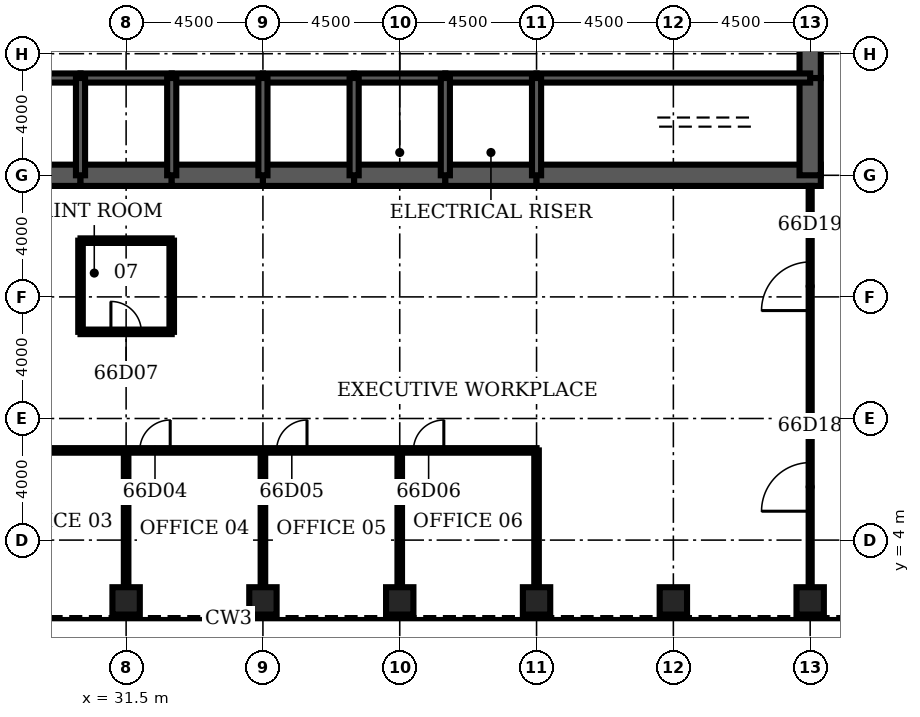
"""IFC4 building model, lengths in metres.
Left out: names, types, materials, properties, quantities, classifications, styles, units other than length and angle.
Written with IfcOpenShell. Run it as: python <this file> out.ifc"""

import sys

from ifc_helpers import new_model, si_unit, direction, frame, frame_2d, origin, origin_2d, place, context, subcontext, project, spatial, rectangle, hollow_rectangle, extrude, element, fill, save


model = new_model("IFC4")
c1 = context("Model", 3, precision=1e-05, world=origin(), true_north=direction((0.0, 1.0)))
c2 = subcontext(c1, "Body", "Model", "MODEL_VIEW")
j1 = project(units=[si_unit("LENGTHUNIT", "METRE"), si_unit("PLANEANGLEUNIT", "RADIAN")], contexts=[c1])
p1 = place(None, origin())
s1 = spatial("IfcSite", under=j1, at=p1, CompositionType="ELEMENT")
p2 = place(p1, origin())
s2 = spatial("IfcBuilding", under=s1, at=p2, CompositionType="ELEMENT")
p3 = place(p2, frame((0.0, 0.0, 292.1)))
s3 = spatial("IfcBuildingStorey", under=s2, at=p3, CompositionType="ELEMENT", Elevation=292.1)
for number, where, z_axis, x_axis in (
    (1, (31.5, 2.0, 0.0), (0.0, 0.0, 1.0), (0.0, 1.0, 0.0)),
    (2, (36.0, 2.0, 0.0), (0.0, 0.0, 1.0), (0.0, 1.0, 0.0)),
    (3, (40.5, 2.0, 0.0), (0.0, 0.0, 1.0), (0.0, 1.0, 0.0)),
    (4, (45.0, 2.0, 0.0), (0.0, 0.0, 1.0), (0.0, 1.0, 0.0)),
    (5, (49.5, 2.0, 0.0), (0.0, 0.0, 1.0), (0.0, 1.0, 0.0)),
    (6, (54.0, 2.0, 0.0), (0.0, 0.0, 1.0), (0.0, 1.0, 0.0)),
):
    element("IfcColumn", number, at=place(p3, frame(where, z_axis=z_axis, x_axis=x_axis)), inside=s3, PredefinedType="COLUMN", context=c2, shape_type="SweptSolid", body=[
        extrude(hollow_rectangle(XDim=0.9, YDim=0.9, WallThickness=0.06, at=origin_2d()), origin(), (0.0, 0.0, 1.0), 4.2),
    ])
for number, where, z_axis, x_axis in (
    (7, (27.0, 16.0, 0.0), (0.0, 0.0, 1.0), (1.0, 0.0, 0.0)),
    (8, (30.0, 16.0, 0.0), (0.0, 0.0, 1.0), (1.0, 0.0, 0.0)),
    (9, (33.0, 16.0, 0.0), (0.0, 0.0, 1.0), (1.0, 0.0, 0.0)),
    (10, (36.0, 16.0, 0.0), (0.0, 0.0, 1.0), (1.0, 0.0, 0.0)),
    (11, (39.0, 16.0, 0.0), (0.0, 0.0, 1.0), (1.0, 0.0, 0.0)),
    (12, (42.0, 16.0, 0.0), (0.0, 0.0, 1.0), (1.0, 0.0, 0.0)),
):
    element("IfcWall", number, at=place(p3, frame(where, z_axis=z_axis, x_axis=x_axis)), inside=s3, PredefinedType="SHEAR", context=c2, shape_type="SweptSolid", body=[
        extrude(rectangle(XDim=3.0, YDim=0.7, at=frame_2d((1.5, 0.0))), origin(), (0.0, 0.0, 1.0), 4.2),
    ])
p4 = place(p3, frame((45.0, 16.0, 0.0), z_axis=(0.0, 0.0, 1.0), x_axis=(1.0, 0.0, 0.0)))
e13 = element("IfcWall", 13, at=p4, inside=s3, PredefinedType="SHEAR", context=c2, shape_type="SweptSolid", body=[
    extrude(rectangle(XDim=9.35, YDim=0.7, at=frame_2d((4.675, 0.0))), origin(), (0.0, 0.0, 1.0), 4.2),
])
p5 = place(p3, frame((54.0, 16.0, 0.0), z_axis=(0.0, 0.0, 1.0), x_axis=(0.0, 1.0, 0.0)))
e14 = element("IfcWall", 14, at=p5, inside=s3, PredefinedType="SHEAR", context=c2, shape_type="SweptSolid", body=[
    extrude(rectangle(XDim=3.2, YDim=0.7, at=frame_2d((1.6, 0.0))), origin(), (0.0, 0.0, 1.0), 4.2),
])
p6 = place(p3, frame((54.0, 19.2, 0.0), z_axis=(0.0, 0.0, 1.0), x_axis=(0.0, 1.0, 0.0)))
e15 = element("IfcWall", 15, at=p6, inside=s3, PredefinedType="SHEAR", context=c2, shape_type="SweptSolid", body=[
    extrude(rectangle(XDim=2.8, YDim=0.7, at=frame_2d((1.4, 0.0))), origin(), (0.0, 0.0, 1.0), 4.2),
])
p7 = place(p6, frame((0.4, 0.0, 0.0)))
e16 = element("IfcOpeningElement", 16, at=p7, cuts=e15, PredefinedType="OPENING", context=c2, shape_type="SweptSolid", body=[
    extrude(rectangle(XDim=1.8, YDim=2.1, at=frame_2d((0.9, 1.05))), frame((0.0, 0.36, 0.0), z_axis=(0.0, -1.0, 0.0), x_axis=(1.0, 0.0, 0.0)), (0.0, 0.0, 1.0), 0.72),
])
p8 = place(p3, frame((27.0, 19.2, 0.0), z_axis=(0.0, 0.0, 1.0), x_axis=(1.0, 0.0, 0.0)))
e17 = element("IfcWall", 17, at=p8, inside=s3, PredefinedType="SOLIDWALL", context=c2, shape_type="SweptSolid", body=[
    extrude(rectangle(XDim=3.0, YDim=0.3, at=frame_2d((1.5, 0.0))), origin(), (0.0, 0.0, 1.0), 4.2),
])
p9 = place(p8, frame((0.95, 0.0, 0.0)))
e18 = element("IfcOpeningElement", 18, at=p9, cuts=e17, PredefinedType="OPENING", context=c2, shape_type="SweptSolid", body=[
    extrude(rectangle(XDim=1.1, YDim=2.2, at=frame_2d((0.55, 1.1))), frame((0.0, 0.16, 0.0), z_axis=(0.0, -1.0, 0.0), x_axis=(1.0, 0.0, 0.0)), (0.0, 0.0, 1.0), 0.32),
])
p10 = place(p3, frame((30.0, 19.2, 0.0), z_axis=(0.0, 0.0, 1.0), x_axis=(1.0, 0.0, 0.0)))
e19 = element("IfcWall", 19, at=p10, inside=s3, PredefinedType="SOLIDWALL", context=c2, shape_type="SweptSolid", body=[
    extrude(rectangle(XDim=3.0, YDim=0.3, at=frame_2d((1.5, 0.0))), origin(), (0.0, 0.0, 1.0), 4.2),
])
p11 = place(p10, frame((0.95, 0.0, 0.0)))
e20 = element("IfcOpeningElement", 20, at=p11, cuts=e19, PredefinedType="OPENING", context=c2, shape_type="SweptSolid", body=[
    extrude(rectangle(XDim=1.1, YDim=2.2, at=frame_2d((0.55, 1.1))), frame((0.0, 0.16, 0.0), z_axis=(0.0, -1.0, 0.0), x_axis=(1.0, 0.0, 0.0)), (0.0, 0.0, 1.0), 0.32),
])
p12 = place(p3, frame((33.0, 19.2, 0.0), z_axis=(0.0, 0.0, 1.0), x_axis=(1.0, 0.0, 0.0)))
e21 = element("IfcWall", 21, at=p12, inside=s3, PredefinedType="SOLIDWALL", context=c2, shape_type="SweptSolid", body=[
    extrude(rectangle(XDim=3.0, YDim=0.3, at=frame_2d((1.5, 0.0))), origin(), (0.0, 0.0, 1.0), 4.2),
])
p13 = place(p12, frame((0.95, 0.0, 0.0)))
e22 = element("IfcOpeningElement", 22, at=p13, cuts=e21, PredefinedType="OPENING", context=c2, shape_type="SweptSolid", body=[
    extrude(rectangle(XDim=1.1, YDim=2.2, at=frame_2d((0.55, 1.1))), frame((0.0, 0.16, 0.0), z_axis=(0.0, -1.0, 0.0), x_axis=(1.0, 0.0, 0.0)), (0.0, 0.0, 1.0), 0.32),
])
p14 = place(p3, frame((36.0, 19.2, 0.0), z_axis=(0.0, 0.0, 1.0), x_axis=(1.0, 0.0, 0.0)))
e23 = element("IfcWall", 23, at=p14, inside=s3, PredefinedType="SOLIDWALL", context=c2, shape_type="SweptSolid", body=[
    extrude(rectangle(XDim=3.0, YDim=0.3, at=frame_2d((1.5, 0.0))), origin(), (0.0, 0.0, 1.0), 4.2),
])
p15 = place(p14, frame((0.95, 0.0, 0.0)))
e24 = element("IfcOpeningElement", 24, at=p15, cuts=e23, PredefinedType="OPENING", context=c2, shape_type="SweptSolid", body=[
    extrude(rectangle(XDim=1.1, YDim=2.2, at=frame_2d((0.55, 1.1))), frame((0.0, 0.16, 0.0), z_axis=(0.0, -1.0, 0.0), x_axis=(1.0, 0.0, 0.0)), (0.0, 0.0, 1.0), 0.32),
])
p16 = place(p3, frame((39.0, 19.2, 0.0), z_axis=(0.0, 0.0, 1.0), x_axis=(1.0, 0.0, 0.0)))
e25 = element("IfcWall", 25, at=p16, inside=s3, PredefinedType="SOLIDWALL", context=c2, shape_type="SweptSolid", body=[
    extrude(rectangle(XDim=3.0, YDim=0.3, at=frame_2d((1.5, 0.0))), origin(), (0.0, 0.0, 1.0), 4.2),
])
p17 = place(p16, frame((1.0, 0.0, 0.0)))
e26 = element("IfcOpeningElement", 26, at=p17, cuts=e25, PredefinedType="OPENING", context=c2, shape_type="SweptSolid", body=[
    extrude(rectangle(XDim=1.0, YDim=2.1, at=frame_2d((0.5, 1.05))), frame((0.0, 0.16, 0.0), z_axis=(0.0, -1.0, 0.0), x_axis=(1.0, 0.0, 0.0)), (0.0, 0.0, 1.0), 0.32),
])
p18 = place(p3, frame((42.0, 19.2, 0.0), z_axis=(0.0, 0.0, 1.0), x_axis=(1.0, 0.0, 0.0)))
e27 = element("IfcWall", 27, at=p18, inside=s3, PredefinedType="SOLIDWALL", context=c2, shape_type="SweptSolid", body=[
    extrude(rectangle(XDim=3.0, YDim=0.3, at=frame_2d((1.5, 0.0))), origin(), (0.0, 0.0, 1.0), 4.2),
])
p19 = place(p18, frame((1.0, 0.0, 0.0)))
e28 = element("IfcOpeningElement", 28, at=p19, cuts=e27, PredefinedType="OPENING", context=c2, shape_type="SweptSolid", body=[
    extrude(rectangle(XDim=1.0, YDim=2.1, at=frame_2d((0.5, 1.05))), frame((0.0, 0.16, 0.0), z_axis=(0.0, -1.0, 0.0), x_axis=(1.0, 0.0, 0.0)), (0.0, 0.0, 1.0), 0.32),
])
p20 = place(p3, frame((45.0, 19.2, 0.0), z_axis=(0.0, 0.0, 1.0), x_axis=(1.0, 0.0, 0.0)))
e29 = element("IfcWall", 29, at=p20, inside=s3, PredefinedType="SOLIDWALL", context=c2, shape_type="SweptSolid", body=[
    extrude(rectangle(XDim=9.0, YDim=0.3, at=frame_2d((4.5, 0.0))), origin(), (0.0, 0.0, 1.0), 4.2),
])
p21 = place(p20, frame((7.35, 0.0, 0.0)))
e30 = element("IfcOpeningElement", 30, at=p21, cuts=e29, PredefinedType="OPENING", context=c2, shape_type="SweptSolid", body=[
    extrude(rectangle(XDim=1.0, YDim=2.1, at=frame_2d((0.5, 1.05))), frame((0.0, 0.16, 0.0), z_axis=(0.0, -1.0, 0.0), x_axis=(1.0, 0.0, 0.0)), (0.0, 0.0, 1.0), 0.32),
])
for number, where, z_axis, x_axis in (
    (31, (30.0, 16.0, 0.0), (0.0, 0.0, 1.0), (0.0, 1.0, 0.0)),
    (32, (33.0, 16.0, 0.0), (0.0, 0.0, 1.0), (0.0, 1.0, 0.0)),
    (33, (36.0, 16.0, 0.0), (0.0, 0.0, 1.0), (0.0, 1.0, 0.0)),
    (34, (39.0, 16.0, 0.0), (0.0, 0.0, 1.0), (0.0, 1.0, 0.0)),
    (35, (42.0, 16.0, 0.0), (0.0, 0.0, 1.0), (0.0, 1.0, 0.0)),
    (36, (45.0, 16.0, 0.0), (0.0, 0.0, 1.0), (0.0, 1.0, 0.0)),
):
    element("IfcWall", number, at=place(p3, frame(where, z_axis=z_axis, x_axis=x_axis)), inside=s3, PredefinedType="SOLIDWALL", context=c2, shape_type="SweptSolid", body=[
        extrude(rectangle(XDim=3.2, YDim=0.3, at=frame_2d((1.6, 0.0))), origin(), (0.0, 0.0, 1.0), 4.2),
    ])
p22 = place(p3, frame((39.15, 17.3, 0.0), z_axis=(0.0, 0.0, 1.0), x_axis=(1.0, 0.0, 0.0)))
e37 = element("IfcWall", 37, at=p22, inside=s3, PredefinedType="SOLIDWALL", context=c2, shape_type="SweptSolid", body=[
    extrude(rectangle(XDim=2.7, YDim=0.3, at=frame_2d((1.35, 0.0))), origin(), (0.0, 0.0, 1.0), 4.04),
])
p23 = place(p22, frame((0.85, 0.0, 0.0)))
e38 = element("IfcOpeningElement", 38, at=p23, cuts=e37, PredefinedType="OPENING", context=c2, shape_type="SweptSolid", body=[
    extrude(rectangle(XDim=1.0, YDim=2.1, at=frame_2d((0.5, 1.05))), frame((0.0, 0.16, 0.0), z_axis=(0.0, -1.0, 0.0), x_axis=(1.0, 0.0, 0.0)), (0.0, 0.0, 1.0), 0.32),
])
p24 = place(p3, frame((42.15, 17.3, 0.0), z_axis=(0.0, 0.0, 1.0), x_axis=(1.0, 0.0, 0.0)))
e39 = element("IfcWall", 39, at=p24, inside=s3, PredefinedType="SOLIDWALL", context=c2, shape_type="SweptSolid", body=[
    extrude(rectangle(XDim=2.7, YDim=0.3, at=frame_2d((1.35, 0.0))), origin(), (0.0, 0.0, 1.0), 4.04),
])
p25 = place(p24, frame((0.85, 0.0, 0.0)))
e40 = element("IfcOpeningElement", 40, at=p25, cuts=e39, PredefinedType="OPENING", context=c2, shape_type="SweptSolid", body=[
    extrude(rectangle(XDim=1.0, YDim=2.1, at=frame_2d((0.5, 1.05))), frame((0.0, 0.16, 0.0), z_axis=(0.0, -1.0, 0.0), x_axis=(1.0, 0.0, 0.0)), (0.0, 0.0, 1.0), 0.32),
])
p26 = place(p3, frame((18.0, 6.95, 0.0), z_axis=(0.0, 0.0, 1.0), x_axis=(1.0, 0.0, 0.0)))
e41 = element("IfcWall", 41, at=p26, inside=s3, PredefinedType="PARTITIONING", context=c2, shape_type="SweptSolid", body=[
    extrude(rectangle(XDim=27.0, YDim=0.15, at=frame_2d((13.5, 0.0))), origin(), (0.0, 0.0, 1.0), 3.0),
])
p27 = place(p26, frame((0.45, 0.0, 0.0)))
e42 = element("IfcOpeningElement", 42, at=p27, cuts=e41, PredefinedType="OPENING", context=c2, shape_type="SweptSolid", body=[
    extrude(rectangle(XDim=1.0, YDim=2.1, at=frame_2d((0.5, 1.05))), frame((0.0, 0.085, 0.0), z_axis=(0.0, -1.0, 0.0), x_axis=(1.0, 0.0, 0.0)), (0.0, 0.0, 1.0), 0.17),
])
p28 = place(p26, frame((4.95, 0.0, 0.0)))
e43 = element("IfcOpeningElement", 43, at=p28, cuts=e41, PredefinedType="OPENING", context=c2, shape_type="SweptSolid", body=[
    extrude(rectangle(XDim=1.0, YDim=2.1, at=frame_2d((0.5, 1.05))), frame((0.0, 0.085, 0.0), z_axis=(0.0, -1.0, 0.0), x_axis=(1.0, 0.0, 0.0)), (0.0, 0.0, 1.0), 0.17),
])
p29 = place(p26, frame((9.45, 0.0, 0.0)))
e44 = element("IfcOpeningElement", 44, at=p29, cuts=e41, PredefinedType="OPENING", context=c2, shape_type="SweptSolid", body=[
    extrude(rectangle(XDim=1.0, YDim=2.1, at=frame_2d((0.5, 1.05))), frame((0.0, 0.085, 0.0), z_axis=(0.0, -1.0, 0.0), x_axis=(1.0, 0.0, 0.0)), (0.0, 0.0, 1.0), 0.17),
])
p30 = place(p26, frame((13.95, 0.0, 0.0)))
e45 = element("IfcOpeningElement", 45, at=p30, cuts=e41, PredefinedType="OPENING", context=c2, shape_type="SweptSolid", body=[
    extrude(rectangle(XDim=1.0, YDim=2.1, at=frame_2d((0.5, 1.05))), frame((0.0, 0.085, 0.0), z_axis=(0.0, -1.0, 0.0), x_axis=(1.0, 0.0, 0.0)), (0.0, 0.0, 1.0), 0.17),
])
p31 = place(p26, frame((18.45, 0.0, 0.0)))
e46 = element("IfcOpeningElement", 46, at=p31, cuts=e41, PredefinedType="OPENING", context=c2, shape_type="SweptSolid", body=[
    extrude(rectangle(XDim=1.0, YDim=2.1, at=frame_2d((0.5, 1.05))), frame((0.0, 0.085, 0.0), z_axis=(0.0, -1.0, 0.0), x_axis=(1.0, 0.0, 0.0)), (0.0, 0.0, 1.0), 0.17),
])
p32 = place(p26, frame((22.95, 0.0, 0.0)))
e47 = element("IfcOpeningElement", 47, at=p32, cuts=e41, PredefinedType="OPENING", context=c2, shape_type="SweptSolid", body=[
    extrude(rectangle(XDim=1.0, YDim=2.1, at=frame_2d((0.5, 1.05))), frame((0.0, 0.085, 0.0), z_axis=(0.0, -1.0, 0.0), x_axis=(1.0, 0.0, 0.0)), (0.0, 0.0, 1.0), 0.17),
])
p33 = place(p3, frame((30.0, 10.85, 0.0), z_axis=(0.0, 0.0, 1.0), x_axis=(1.0, 0.0, 0.0)))
e48 = element("IfcWall", 48, at=p33, inside=s3, PredefinedType="PARTITIONING", context=c2, shape_type="SweptSolid", body=[
    extrude(rectangle(XDim=3.0, YDim=0.15, at=frame_2d((1.5, 0.0))), origin(), (0.0, 0.0, 1.0), 3.0),
])
p34 = place(p33, frame((1.0, 0.0, 0.0)))
e49 = element("IfcOpeningElement", 49, at=p34, cuts=e48, PredefinedType="OPENING", context=c2, shape_type="SweptSolid", body=[
    extrude(rectangle(XDim=1.0, YDim=2.1, at=frame_2d((0.5, 1.05))), frame((0.0, 0.085, 0.0), z_axis=(0.0, -1.0, 0.0), x_axis=(1.0, 0.0, 0.0)), (0.0, 0.0, 1.0), 0.17),
])
for number, where, z_axis, x_axis in (
    (50, (30.0, 13.85, 0.0), (0.0, 0.0, 1.0), (1.0, 0.0, 0.0)),
    (51, (30.0, 10.85, 0.0), (0.0, 0.0, 1.0), (0.0, 1.0, 0.0)),
):
    element("IfcWall", number, at=place(p3, frame(where, z_axis=z_axis, x_axis=x_axis)), inside=s3, PredefinedType="PARTITIONING", context=c2, shape_type="SweptSolid", body=[
        extrude(rectangle(XDim=3.0, YDim=0.15, at=frame_2d((1.5, 0.0))), origin(), (0.0, 0.0, 1.0), 3.0),
    ])
p35 = place(p3, frame((31.5, 2.45, 0.0), z_axis=(0.0, 0.0, 1.0), x_axis=(0.0, 1.0, 0.0)))
e52 = element("IfcWall", 52, at=p35, inside=s3, PredefinedType="PARTITIONING", context=c2, shape_type="SweptSolid", body=[
    extrude(rectangle(XDim=4.5, YDim=0.15, at=frame_2d((2.25, 0.0))), origin(), (0.0, 0.0, 1.0), 3.0),
])
p36 = place(p3, frame((33.0, 10.85, 0.0), z_axis=(0.0, 0.0, 1.0), x_axis=(0.0, 1.0, 0.0)))
e53 = element("IfcWall", 53, at=p36, inside=s3, PredefinedType="PARTITIONING", context=c2, shape_type="SweptSolid", body=[
    extrude(rectangle(XDim=3.0, YDim=0.15, at=frame_2d((1.5, 0.0))), origin(), (0.0, 0.0, 1.0), 3.0),
])
for number, where, z_axis, x_axis in (
    (54, (36.0, 2.45, 0.0), (0.0, 0.0, 1.0), (0.0, 1.0, 0.0)),
    (55, (40.5, 2.45, 0.0), (0.0, 0.0, 1.0), (0.0, 1.0, 0.0)),
    (56, (45.0, 2.45, 0.0), (0.0, 0.0, 1.0), (0.0, 1.0, 0.0)),
):
    element("IfcWall", number, at=place(p3, frame(where, z_axis=z_axis, x_axis=x_axis)), inside=s3, PredefinedType="PARTITIONING", context=c2, shape_type="SweptSolid", body=[
        extrude(rectangle(XDim=4.5, YDim=0.15, at=frame_2d((2.25, 0.0))), origin(), (0.0, 0.0, 1.0), 3.0),
    ])
p37 = place(p3, frame((54.0, 2.45, 0.0), z_axis=(0.0, 0.0, 1.0), x_axis=(0.0, 1.0, 0.0)))
e57 = element("IfcWall", 57, at=p37, inside=s3, PredefinedType="PARTITIONING", context=c2, shape_type="SweptSolid", body=[
    extrude(rectangle(XDim=13.2, YDim=0.1, at=frame_2d((6.6, 0.0))), origin(), (0.0, 0.0, 1.0), 3.0),
])
p38 = place(p37, frame((2.5, 0.0, 0.0)))
e58 = element("IfcOpeningElement", 58, at=p38, cuts=e57, PredefinedType="OPENING", context=c2, shape_type="SweptSolid", body=[
    extrude(rectangle(XDim=1.6, YDim=2.1, at=frame_2d((0.8, 1.05))), frame((0.0, 0.06, 0.0), z_axis=(0.0, -1.0, 0.0), x_axis=(1.0, 0.0, 0.0)), (0.0, 0.0, 1.0), 0.12),
])
p39 = place(p37, frame((9.1, 0.0, 0.0)))
e59 = element("IfcOpeningElement", 59, at=p39, cuts=e57, PredefinedType="OPENING", context=c2, shape_type="SweptSolid", body=[
    extrude(rectangle(XDim=1.6, YDim=2.1, at=frame_2d((0.8, 1.05))), frame((0.0, 0.06, 0.0), z_axis=(0.0, -1.0, 0.0), x_axis=(1.0, 0.0, 0.0)), (0.0, 0.0, 1.0), 0.12),
])
p40 = place(p23, origin())
e60 = element("IfcDoor", 60, at=p40, inside=s3, OperationType="SINGLE_SWING_LEFT", PredefinedType="DOOR", context=c2, shape_type="SweptSolid", body=[
    extrude(rectangle(XDim=1.0, YDim=2.1, at=frame_2d((0.5, 1.05))), frame((0.0, 0.025, 0.0), z_axis=(0.0, -1.0, 0.0), x_axis=(1.0, 0.0, 0.0)), (0.0, 0.0, 1.0), 0.05),
])
fill(e38, e60)
p41 = place(p25, origin())
e61 = element("IfcDoor", 61, at=p41, inside=s3, OperationType="SINGLE_SWING_LEFT", PredefinedType="DOOR", context=c2, shape_type="SweptSolid", body=[
    extrude(rectangle(XDim=1.0, YDim=2.1, at=frame_2d((0.5, 1.05))), frame((0.0, 0.025, 0.0), z_axis=(0.0, -1.0, 0.0), x_axis=(1.0, 0.0, 0.0)), (0.0, 0.0, 1.0), 0.05),
])
fill(e40, e61)
p42 = place(p30, origin())
e62 = element("IfcDoor", 62, at=p42, inside=s3, OperationType="SINGLE_SWING_RIGHT", PredefinedType="DOOR", context=c2, shape_type="SweptSolid", body=[
    extrude(rectangle(XDim=1.0, YDim=2.1, at=frame_2d((0.5, 1.05))), frame((0.0, 0.025, 0.0), z_axis=(0.0, -1.0, 0.0), x_axis=(1.0, 0.0, 0.0)), (0.0, 0.0, 1.0), 0.05),
])
fill(e45, e62)
p43 = place(p31, origin())
e63 = element("IfcDoor", 63, at=p43, inside=s3, OperationType="SINGLE_SWING_RIGHT", PredefinedType="DOOR", context=c2, shape_type="SweptSolid", body=[
    extrude(rectangle(XDim=1.0, YDim=2.1, at=frame_2d((0.5, 1.05))), frame((0.0, 0.025, 0.0), z_axis=(0.0, -1.0, 0.0), x_axis=(1.0, 0.0, 0.0)), (0.0, 0.0, 1.0), 0.05),
])
fill(e46, e63)
p44 = place(p32, origin())
e64 = element("IfcDoor", 64, at=p44, inside=s3, OperationType="SINGLE_SWING_RIGHT", PredefinedType="DOOR", context=c2, shape_type="SweptSolid", body=[
    extrude(rectangle(XDim=1.0, YDim=2.1, at=frame_2d((0.5, 1.05))), frame((0.0, 0.025, 0.0), z_axis=(0.0, -1.0, 0.0), x_axis=(1.0, 0.0, 0.0)), (0.0, 0.0, 1.0), 0.05),
])
fill(e47, e64)
p45 = place(p34, origin())
e65 = element("IfcDoor", 65, at=p45, inside=s3, OperationType="SINGLE_SWING_LEFT", PredefinedType="DOOR", context=c2, shape_type="SweptSolid", body=[
    extrude(rectangle(XDim=1.0, YDim=2.1, at=frame_2d((0.5, 1.05))), frame((0.0, 0.025, 0.0), z_axis=(0.0, -1.0, 0.0), x_axis=(1.0, 0.0, 0.0)), (0.0, 0.0, 1.0), 0.05),
])
fill(e49, e65)
p46 = place(p38, origin())
e66 = element("IfcDoor", 66, at=p46, inside=s3, OperationType="SINGLE_SWING_LEFT", PredefinedType="DOOR", context=c2, shape_type="SweptSolid", body=[
    extrude(rectangle(XDim=1.6, YDim=2.1, at=frame_2d((0.8, 1.05))), frame((0.0, 0.025, 0.0), z_axis=(0.0, -1.0, 0.0), x_axis=(1.0, 0.0, 0.0)), (0.0, 0.0, 1.0), 0.05),
])
fill(e58, e66)
p47 = place(p39, origin())
e67 = element("IfcDoor", 67, at=p47, inside=s3, OperationType="SINGLE_SWING_LEFT", PredefinedType="DOOR", context=c2, shape_type="SweptSolid", body=[
    extrude(rectangle(XDim=1.6, YDim=2.1, at=frame_2d((0.8, 1.05))), frame((0.0, 0.025, 0.0), z_axis=(0.0, -1.0, 0.0), x_axis=(1.0, 0.0, 0.0)), (0.0, 0.0, 1.0), 0.05),
])
fill(e59, e67)
p48 = place(p11, origin())
e68 = element("IfcDoor", 68, at=p48, inside=s3, OperationType="DOUBLE_DOOR_SLIDING", PredefinedType="USERDEFINED", context=c2, shape_type="SweptSolid", body=[
    extrude(rectangle(XDim=1.1, YDim=2.2, at=frame_2d((0.55, 1.1))), frame((0.0, 0.025, 0.0), z_axis=(0.0, -1.0, 0.0), x_axis=(1.0, 0.0, 0.0)), (0.0, 0.0, 1.0), 0.05),
])
fill(e20, e68)
p49 = place(p13, origin())
e69 = element("IfcDoor", 69, at=p49, inside=s3, OperationType="DOUBLE_DOOR_SLIDING", PredefinedType="USERDEFINED", context=c2, shape_type="SweptSolid", body=[
    extrude(rectangle(XDim=1.1, YDim=2.2, at=frame_2d((0.55, 1.1))), frame((0.0, 0.025, 0.0), z_axis=(0.0, -1.0, 0.0), x_axis=(1.0, 0.0, 0.0)), (0.0, 0.0, 1.0), 0.05),
])
fill(e22, e69)
p50 = place(p15, origin())
e70 = element("IfcDoor", 70, at=p50, inside=s3, OperationType="DOUBLE_DOOR_SLIDING", PredefinedType="USERDEFINED", context=c2, shape_type="SweptSolid", body=[
    extrude(rectangle(XDim=1.1, YDim=2.2, at=frame_2d((0.55, 1.1))), frame((0.0, 0.025, 0.0), z_axis=(0.0, -1.0, 0.0), x_axis=(1.0, 0.0, 0.0)), (0.0, 0.0, 1.0), 0.05),
])
fill(e24, e70)
p51 = place(p21, origin())
e71 = element("IfcDoor", 71, at=p51, inside=s3, OperationType="SINGLE_SWING_RIGHT", PredefinedType="DOOR", context=c2, shape_type="SweptSolid", body=[
    extrude(rectangle(XDim=1.0, YDim=2.1, at=frame_2d((0.5, 1.05))), frame((0.0, 0.025, 0.0), z_axis=(0.0, -1.0, 0.0), x_axis=(1.0, 0.0, 0.0)), (0.0, 0.0, 1.0), 0.05),
])
fill(e30, e71)
p52 = place(p7, origin())
e72 = element("IfcDoor", 72, at=p52, inside=s3, OperationType="SINGLE_SWING_LEFT", PredefinedType="DOOR", context=c2, shape_type="SweptSolid", body=[
    extrude(rectangle(XDim=1.8, YDim=2.1, at=frame_2d((0.9, 1.05))), frame((0.0, 0.35, 0.0), z_axis=(0.0, -1.0, 0.0), x_axis=(1.0, 0.0, 0.0)), (0.0, 0.0, 1.0), 0.699),
])
fill(e16, e72)
p53 = place(p17, origin())
e73 = element("IfcDoor", 73, at=p53, inside=s3, OperationType="SINGLE_SWING_LEFT", PredefinedType="DOOR", context=c2, shape_type="SweptSolid", body=[
    extrude(rectangle(XDim=1.0, YDim=2.1, at=frame_2d((0.5, 1.05))), frame((0.0, 0.025, 0.0), z_axis=(0.0, -1.0, 0.0), x_axis=(1.0, 0.0, 0.0)), (0.0, 0.0, 1.0), 0.05),
])
fill(e26, e73)
p54 = place(p19, origin())
e74 = element("IfcDoor", 74, at=p54, inside=s3, OperationType="SINGLE_SWING_LEFT", PredefinedType="DOOR", context=c2, shape_type="SweptSolid", body=[
    extrude(rectangle(XDim=1.0, YDim=2.1, at=frame_2d((0.5, 1.05))), frame((0.0, 0.025, 0.0), z_axis=(0.0, -1.0, 0.0), x_axis=(1.0, 0.0, 0.0)), (0.0, 0.0, 1.0), 0.05),
])
fill(e28, e74)
save(model, sys.argv[1])
